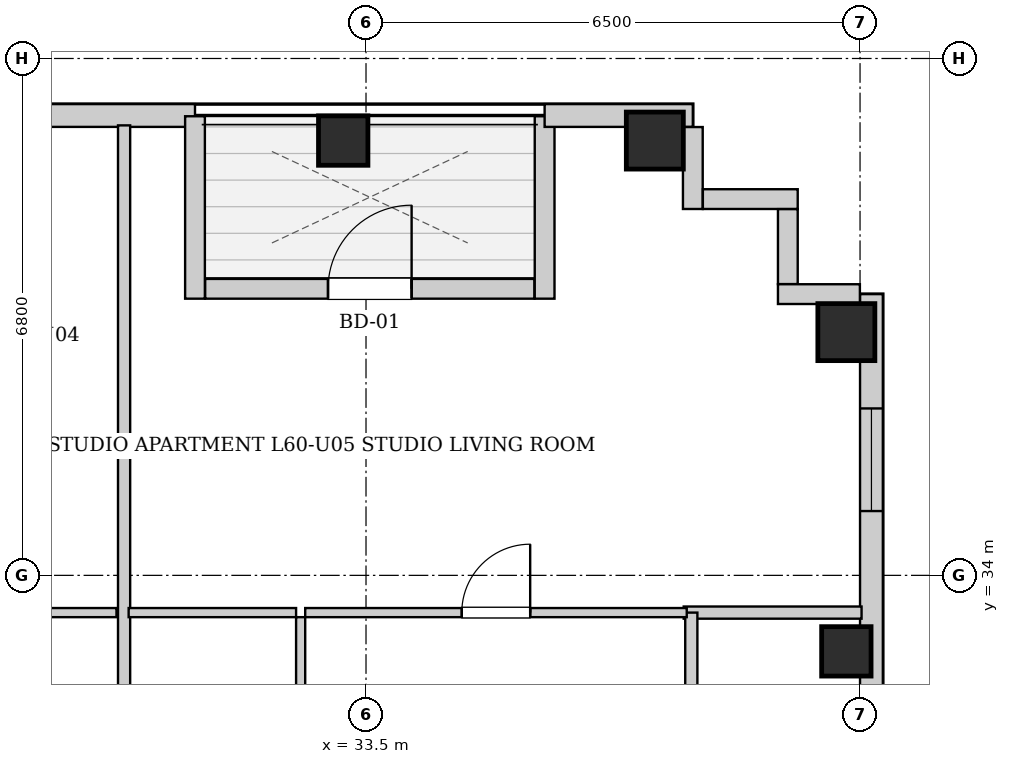
"""IFC4 building model, lengths in metres.
Left out: names, types, materials, properties, quantities, classifications, styles, units other than length and angle.
Written with IfcOpenShell. Run it as: python <this file> out.ifc"""

import sys

from ifc_helpers import new_model, si_unit, direction, frame, frame_2d, origin, origin_2d, place, context, subcontext, project, spatial, rectangle, extrude, element, fill, save


model = new_model("IFC4")
c1 = context("Model", 3, precision=1e-05, world=origin(), true_north=direction((0.0, 1.0)))
c2 = subcontext(c1, "Body", "Model", "MODEL_VIEW")
j1 = project(units=[si_unit("LENGTHUNIT", "METRE"), si_unit("PLANEANGLEUNIT", "RADIAN")], contexts=[c1])
p1 = place(None, origin())
s1 = spatial("IfcSite", under=j1, at=p1, CompositionType="ELEMENT")
p2 = place(p1, origin())
s2 = spatial("IfcBuilding", under=s1, at=p2, CompositionType="ELEMENT")
p3 = place(p2, frame((0.0, 0.0, 207.4)))
s3 = spatial("IfcBuildingStorey", under=s2, at=p3, CompositionType="ELEMENT", Elevation=207.4)
p4 = place(p3, frame((33.2, 39.72, 0.0), z_axis=(0.0, 0.0, 1.0), x_axis=(1.0, 0.0, 0.0)))
e1 = element("IfcColumn", 1, at=p4, inside=s3, PredefinedType="COLUMN", context=c2, shape_type="SweptSolid", body=[
    extrude(rectangle(XDim=0.65, YDim=0.65, at=origin_2d()), origin(), (0.0, 0.0, 1.0), 3.3),
])
p5 = place(p3, frame((37.3, 39.72, 0.0), z_axis=(0.0, 0.0, 1.0), x_axis=(1.0, 0.0, 0.0)))
e2 = element("IfcColumn", 2, at=p5, inside=s3, PredefinedType="COLUMN", context=c2, shape_type="SweptSolid", body=[
    extrude(rectangle(XDim=0.75, YDim=0.75, at=origin_2d()), origin(), (0.0, 0.0, 1.0), 3.3),
])
p6 = place(p3, frame((39.82, 33.0, 0.0), z_axis=(0.0, 0.0, 1.0), x_axis=(1.0, 0.0, 0.0)))
e3 = element("IfcColumn", 3, at=p6, inside=s3, PredefinedType="COLUMN", context=c2, shape_type="SweptSolid", body=[
    extrude(rectangle(XDim=0.65, YDim=0.65, at=origin_2d()), origin(), (0.0, 0.0, 1.0), 3.3),
])
p7 = place(p3, frame((39.82, 37.2, 0.0), z_axis=(0.0, 0.0, 1.0), x_axis=(1.0, 0.0, 0.0)))
e4 = element("IfcColumn", 4, at=p7, inside=s3, PredefinedType="COLUMN", context=c2, shape_type="SweptSolid", body=[
    extrude(rectangle(XDim=0.75, YDim=0.75, at=origin_2d()), origin(), (0.0, 0.0, 1.0), 3.3),
])
p8 = place(p3, frame((19.7, 40.05, 0.0), z_axis=(0.0, 0.0, 1.0), x_axis=(1.0, 0.0, 0.0)))
e5 = element("IfcWall", 5, at=p8, inside=s3, PredefinedType="SOLIDWALL", context=c2, shape_type="SweptSolid", body=[
    extrude(rectangle(XDim=11.55, YDim=0.3, at=frame_2d((5.775, 0.0))), origin(), (0.0, 0.0, 1.0), 3.04),
])
p9 = place(p8, frame((0.267, 0.0, 0.55)))
e6 = element("IfcOpeningElement", 6, at=p9, cuts=e5, PredefinedType="OPENING", context=c2, shape_type="SweptSolid", body=[
    extrude(rectangle(XDim=0.85, YDim=1.2, at=frame_2d((0.425, 0.6))), frame((0.0, 0.16, 0.0), z_axis=(0.0, -1.0, 0.0), x_axis=(1.0, 0.0, 0.0)), (0.0, 0.0, 1.0), 0.32),
])
p10 = place(p8, frame((1.95, 0.0, 0.55)))
e7 = element("IfcOpeningElement", 7, at=p10, cuts=e5, PredefinedType="OPENING", context=c2, shape_type="SweptSolid", body=[
    extrude(rectangle(XDim=0.85, YDim=1.2, at=frame_2d((0.425, 0.6))), frame((0.0, 0.16, 0.0), z_axis=(0.0, -1.0, 0.0), x_axis=(1.0, 0.0, 0.0)), (0.0, 0.0, 1.0), 0.32),
])
p11 = place(p8, frame((7.8, 0.0, 0.55)))
e8 = element("IfcOpeningElement", 8, at=p11, cuts=e5, PredefinedType="OPENING", context=c2, shape_type="SweptSolid", body=[
    extrude(rectangle(XDim=1.35, YDim=1.2, at=frame_2d((0.675, 0.6))), frame((0.0, 0.16, 0.0), z_axis=(0.0, -1.0, 0.0), x_axis=(1.0, 0.0, 0.0)), (0.0, 0.0, 1.0), 0.32),
])
p12 = place(p3, frame((31.25, 40.04, 0.0), z_axis=(0.0, 0.0, 1.0), x_axis=(0.0, -1.0, 0.0)))
e9 = element("IfcWall", 9, at=p12, inside=s3, PredefinedType="SOLIDWALL", context=c2, shape_type="SweptSolid", body=[
    extrude(rectangle(XDim=2.4, YDim=0.26, at=frame_2d((1.2, 0.0))), origin(), (0.0, 0.0, 1.0), 3.04),
])
p13 = place(p3, frame((31.384, 37.77, 0.0), z_axis=(0.0, 0.0, 1.0), x_axis=(1.0, 0.0, 0.0)))
e10 = element("IfcWall", 10, at=p13, inside=s3, PredefinedType="SOLIDWALL", context=c2, shape_type="SweptSolid", body=[
    extrude(rectangle(XDim=4.332, YDim=0.26, at=frame_2d((2.166, 0.0))), origin(), (0.0, 0.0, 1.0), 3.04),
])
p14 = place(p13, frame((1.616, 0.0, 0.0)))
e11 = element("IfcOpeningElement", 11, at=p14, cuts=e10, PredefinedType="OPENING", context=c2, shape_type="SweptSolid", body=[
    extrude(rectangle(XDim=1.1, YDim=2.0, at=frame_2d((0.55, 1.0))), frame((0.0, 0.14, 0.0), z_axis=(0.0, -1.0, 0.0), x_axis=(1.0, 0.0, 0.0)), (0.0, 0.0, 1.0), 0.28),
])
p15 = place(p3, frame((35.85, 37.64, 0.0), z_axis=(0.0, 0.0, 1.0), x_axis=(0.0, 1.0, 0.0)))
e12 = element("IfcWall", 12, at=p15, inside=s3, PredefinedType="SOLIDWALL", context=c2, shape_type="SweptSolid", body=[
    extrude(rectangle(XDim=2.4, YDim=0.26, at=frame_2d((1.2, 0.0))), origin(), (0.0, 0.0, 1.0), 3.04),
])
p16 = place(p3, frame((35.85, 40.05, 0.0), z_axis=(0.0, 0.0, 1.0), x_axis=(1.0, 0.0, 0.0)))
e13 = element("IfcWall", 13, at=p16, inside=s3, PredefinedType="SOLIDWALL", context=c2, shape_type="SweptSolid", body=[
    extrude(rectangle(XDim=1.95, YDim=0.3, at=frame_2d((0.975, 0.0))), origin(), (0.0, 0.0, 1.0), 3.04),
])
p17 = place(p3, frame((40.15, 37.7, 0.0), z_axis=(0.0, 0.0, 1.0), x_axis=(0.0, -1.0, 0.0)))
e14 = element("IfcWall", 14, at=p17, inside=s3, PredefinedType="SOLIDWALL", context=c2, shape_type="SweptSolid", body=[
    extrude(rectangle(XDim=31.4, YDim=0.3, at=frame_2d((15.7, 0.0))), origin(), (0.0, 0.0, 1.0), 3.04),
])
p18 = place(p17, frame((1.504, 0.0, 0.55)))
e15 = element("IfcOpeningElement", 15, at=p18, cuts=e14, PredefinedType="OPENING", context=c2, shape_type="SweptSolid", body=[
    extrude(rectangle(XDim=1.35, YDim=1.2, at=frame_2d((0.675, 0.6))), frame((0.0, 0.16, 0.0), z_axis=(0.0, -1.0, 0.0), x_axis=(1.0, 0.0, 0.0)), (0.0, 0.0, 1.0), 0.32),
])
p19 = place(p17, frame((19.683, 0.0, 0.55)))
e16 = element("IfcOpeningElement", 16, at=p19, cuts=e14, PredefinedType="OPENING", context=c2, shape_type="SweptSolid", body=[
    extrude(rectangle(XDim=1.35, YDim=1.2, at=frame_2d((0.675, 0.6))), frame((0.0, 0.16, 0.0), z_axis=(0.0, -1.0, 0.0), x_axis=(1.0, 0.0, 0.0)), (0.0, 0.0, 1.0), 0.32),
])
p20 = place(p17, frame((10.367, 0.0, 0.55)))
e17 = element("IfcOpeningElement", 17, at=p20, cuts=e14, PredefinedType="OPENING", context=c2, shape_type="SweptSolid", body=[
    extrude(rectangle(XDim=1.35, YDim=1.2, at=frame_2d((0.675, 0.6))), frame((0.0, 0.16, 0.0), z_axis=(0.0, -1.0, 0.0), x_axis=(1.0, 0.0, 0.0)), (0.0, 0.0, 1.0), 0.32),
])
p21 = place(p3, frame((37.8, 39.898, 0.0), z_axis=(0.0, 0.0, 1.0), x_axis=(0.0, -1.0, 0.0)))
e18 = element("IfcWall", 18, at=p21, inside=s3, PredefinedType="SOLIDWALL", context=c2, shape_type="SweptSolid", body=[
    extrude(rectangle(XDim=1.078, YDim=0.26, at=frame_2d((0.539, 0.0))), origin(), (0.0, 0.0, 1.0), 3.04),
])
p22 = place(p3, frame((37.932, 38.95, 0.0), z_axis=(0.0, 0.0, 1.0), x_axis=(1.0, 0.0, 0.0)))
e19 = element("IfcWall", 19, at=p22, inside=s3, PredefinedType="SOLIDWALL", context=c2, shape_type="SweptSolid", body=[
    extrude(rectangle(XDim=1.248, YDim=0.26, at=frame_2d((0.624, 0.0))), origin(), (0.0, 0.0, 1.0), 3.04),
])
p23 = place(p3, frame((39.05, 38.818, 0.0), z_axis=(0.0, 0.0, 1.0), x_axis=(0.0, -1.0, 0.0)))
e20 = element("IfcWall", 20, at=p23, inside=s3, PredefinedType="SOLIDWALL", context=c2, shape_type="SweptSolid", body=[
    extrude(rectangle(XDim=0.986, YDim=0.26, at=frame_2d((0.493, 0.0))), origin(), (0.0, 0.0, 1.0), 3.04),
])
p24 = place(p3, frame((38.92, 37.7, 0.0), z_axis=(0.0, 0.0, 1.0), x_axis=(1.0, 0.0, 0.0)))
e21 = element("IfcWall", 21, at=p24, inside=s3, PredefinedType="SOLIDWALL", context=c2, shape_type="SweptSolid", body=[
    extrude(rectangle(XDim=1.078, YDim=0.26, at=frame_2d((0.539, 0.0))), origin(), (0.0, 0.0, 1.0), 3.04),
])
p25 = place(p3, frame((26.54, 33.51, 0.0), z_axis=(0.0, 0.0, 1.0), x_axis=(1.0, 0.0, 0.0)))
e22 = element("IfcWall", 22, at=p25, inside=s3, PredefinedType="PARTITIONING", context=c2, shape_type="SweptSolid", body=[
    extrude(rectangle(XDim=3.677, YDim=0.12, at=frame_2d((1.838, 0.0))), origin(), (0.0, 0.0, 1.0), 3.04),
])
p26 = place(p25, frame((1.388, 0.0, 0.0)))
e23 = element("IfcOpeningElement", 23, at=p26, cuts=e22, PredefinedType="OPENING", context=c2, shape_type="SweptSolid", body=[
    extrude(rectangle(XDim=0.9, YDim=2.05, at=frame_2d((0.45, 1.025))), frame((0.0, 0.07, 0.0), z_axis=(0.0, -1.0, 0.0), x_axis=(1.0, 0.0, 0.0)), (0.0, 0.0, 1.0), 0.14),
])
p27 = place(p3, frame((37.68, 33.51, 0.0), z_axis=(0.0, 0.0, 1.0), x_axis=(1.0, 0.0, 0.0)))
e24 = element("IfcWall", 24, at=p27, inside=s3, PredefinedType="PARTITIONING", context=c2, shape_type="SweptSolid", body=[
    extrude(rectangle(XDim=2.34, YDim=0.16, at=frame_2d((1.17, 0.0))), origin(), (0.0, 0.0, 1.0), 3.04),
])
p28 = place(p3, frame((37.78, 30.6, 0.0), z_axis=(0.0, 0.0, 1.0), x_axis=(0.0, 1.0, 0.0)))
e25 = element("IfcWall", 25, at=p28, inside=s3, PredefinedType="PARTITIONING", context=c2, shape_type="SweptSolid", body=[
    extrude(rectangle(XDim=2.91, YDim=0.16, at=frame_2d((1.455, 0.0))), origin(), (0.0, 0.0, 1.0), 3.04),
])
p29 = place(p3, frame((30.317, 30.6, 0.0), z_axis=(0.0, 0.0, 1.0), x_axis=(0.0, 1.0, 0.0)))
e26 = element("IfcWall", 26, at=p29, inside=s3, PredefinedType="PARTITIONING", context=c2, shape_type="SweptSolid", body=[
    extrude(rectangle(XDim=9.32, YDim=0.16, at=frame_2d((4.66, 0.0))), origin(), (0.0, 0.0, 1.0), 3.04),
])
p30 = place(p3, frame((32.64, 30.6, 0.0), z_axis=(0.0, 0.0, 1.0), x_axis=(0.0, 1.0, 0.0)))
e27 = element("IfcWall", 27, at=p30, inside=s3, PredefinedType="PARTITIONING", context=c2, shape_type="SweptSolid", body=[
    extrude(rectangle(XDim=2.85, YDim=0.12, at=frame_2d((1.425, 0.0))), origin(), (0.0, 0.0, 1.0), 3.04),
])
p31 = place(p30, frame((0.995, 0.0, 0.0)))
e28 = element("IfcOpeningElement", 28, at=p31, cuts=e27, PredefinedType="OPENING", context=c2, shape_type="SweptSolid", body=[
    extrude(rectangle(XDim=0.86, YDim=2.05, at=frame_2d((0.43, 1.025))), frame((0.0, 0.07, 0.0), z_axis=(0.0, -1.0, 0.0), x_axis=(1.0, 0.0, 0.0)), (0.0, 0.0, 1.0), 0.14),
])
p32 = place(p3, frame((30.377, 33.51, 0.0), z_axis=(0.0, 0.0, 1.0), x_axis=(1.0, 0.0, 0.0)))
e29 = element("IfcWall", 29, at=p32, inside=s3, PredefinedType="PARTITIONING", context=c2, shape_type="SweptSolid", body=[
    extrude(rectangle(XDim=2.203, YDim=0.12, at=frame_2d((1.102, 0.0))), origin(), (0.0, 0.0, 1.0), 3.04),
])
p33 = place(p3, frame((32.7, 33.51, 0.0), z_axis=(0.0, 0.0, 1.0), x_axis=(1.0, 0.0, 0.0)))
e30 = element("IfcWall", 30, at=p33, inside=s3, PredefinedType="PARTITIONING", context=c2, shape_type="SweptSolid", body=[
    extrude(rectangle(XDim=5.02, YDim=0.12, at=frame_2d((2.51, 0.0))), origin(), (0.0, 0.0, 1.0), 3.04),
])
p34 = place(p33, frame((2.06, 0.0, 0.0)))
e31 = element("IfcOpeningElement", 31, at=p34, cuts=e30, PredefinedType="OPENING", context=c2, shape_type="SweptSolid", body=[
    extrude(rectangle(XDim=0.9, YDim=2.05, at=frame_2d((0.45, 1.025))), frame((0.0, 0.07, 0.0), z_axis=(0.0, -1.0, 0.0), x_axis=(1.0, 0.0, 0.0)), (0.0, 0.0, 1.0), 0.14),
])
p35 = place(p34, origin())
e32 = element("IfcDoor", 32, at=p35, inside=s3, OperationType="SINGLE_SWING_RIGHT", PredefinedType="DOOR", context=c2, shape_type="SweptSolid", body=[
    extrude(rectangle(XDim=0.9, YDim=2.05, at=frame_2d((0.45, 1.025))), frame((0.0, 0.025, 0.0), z_axis=(0.0, -1.0, 0.0), x_axis=(1.0, 0.0, 0.0)), (0.0, 0.0, 1.0), 0.05),
])
fill(e31, e32)
p36 = place(p14, origin())
e33 = element("IfcDoor", 33, at=p36, inside=s3, OperationType="SINGLE_SWING_RIGHT", PredefinedType="DOOR", context=c2, shape_type="SweptSolid", body=[
    extrude(rectangle(XDim=1.1, YDim=2.0, at=frame_2d((0.55, 1.0))), frame((0.0, 0.025, 0.0), z_axis=(0.0, -1.0, 0.0), x_axis=(1.0, 0.0, 0.0)), (0.0, 0.0, 1.0), 0.05),
])
fill(e11, e33)
p37 = place(p18, origin())
e34 = element("IfcWindow", 34, at=p37, inside=s3, PartitioningType="SINGLE_PANEL", PredefinedType="WINDOW", context=c2, shape_type="SweptSolid", body=[
    extrude(rectangle(XDim=1.35, YDim=1.2, at=frame_2d((0.675, 0.6))), frame((0.0, 0.03, 0.0), z_axis=(0.0, -1.0, 0.0), x_axis=(1.0, 0.0, 0.0)), (0.0, 0.0, 1.0), 0.06),
])
fill(e15, e34)
save(model, sys.argv[1])
